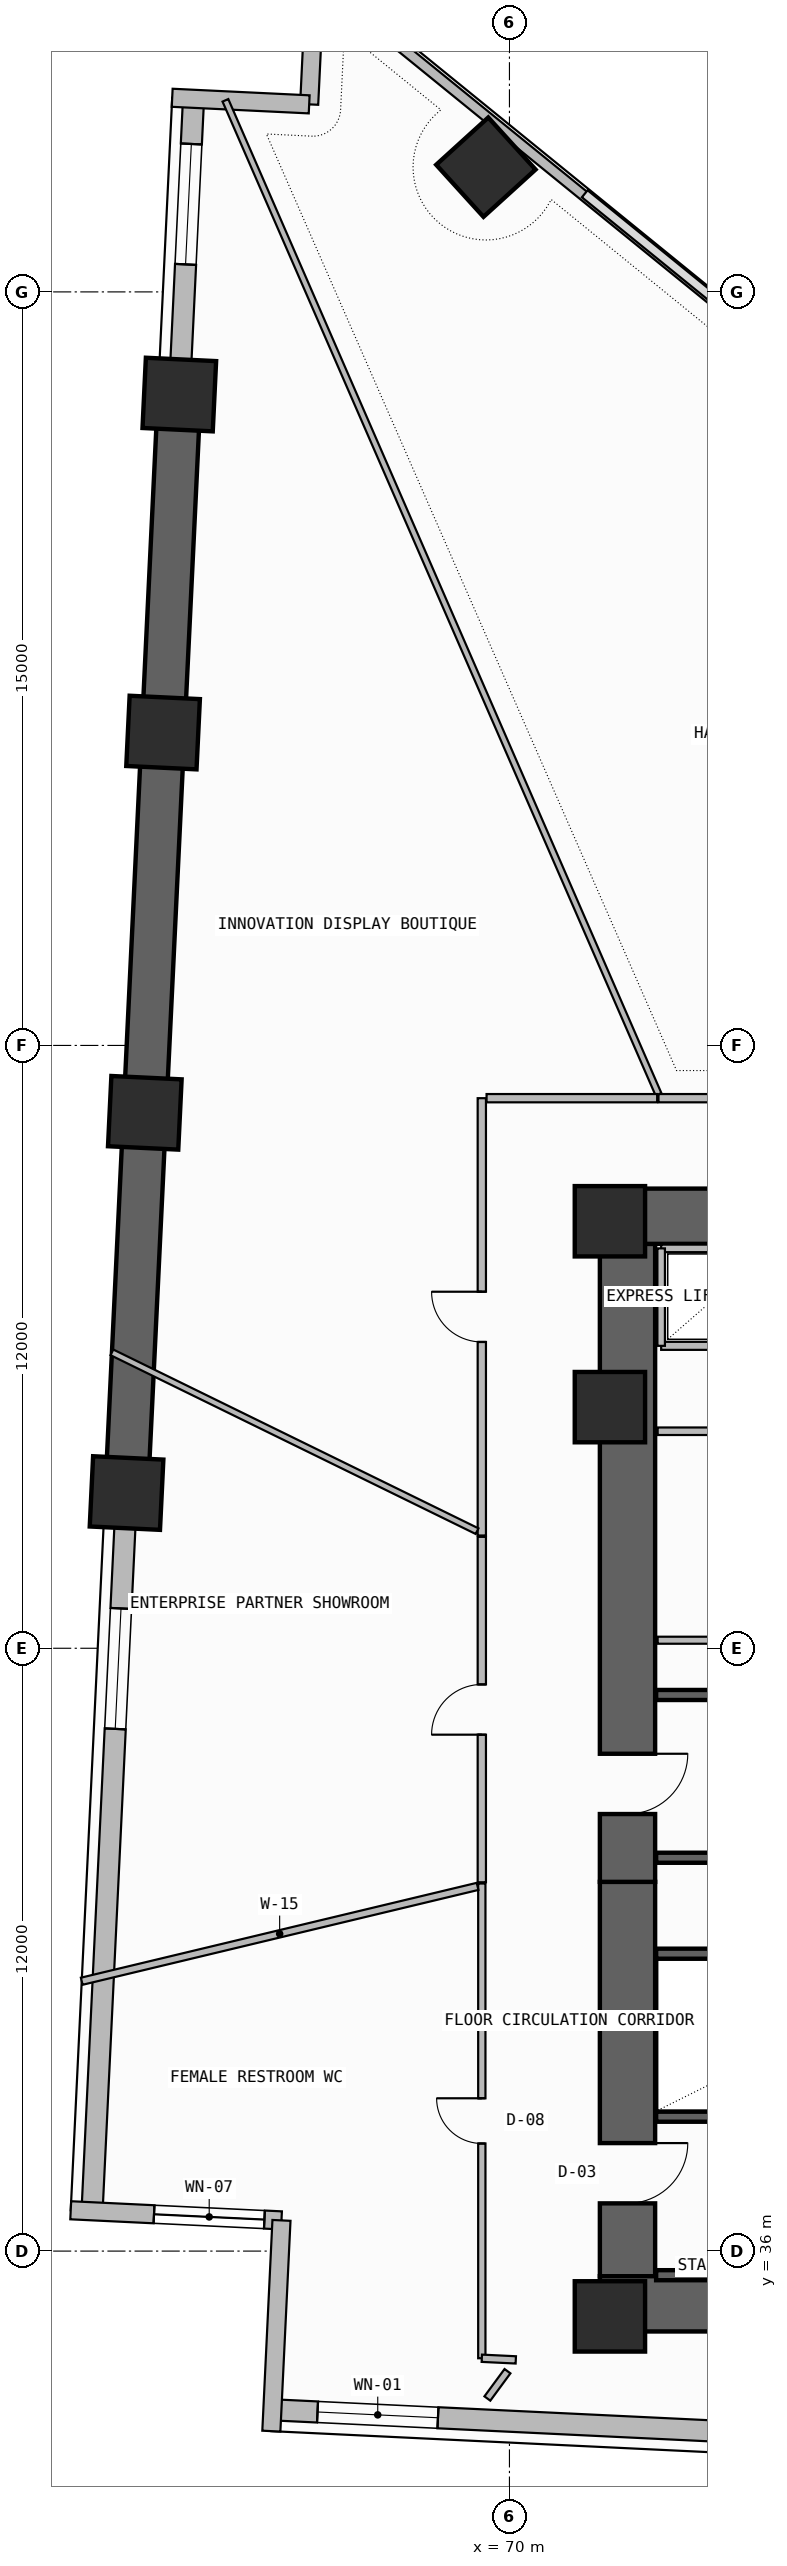
"""IFC4 building model, lengths in metres.
Left out: names, types, materials, properties, quantities, classifications, styles, units other than length and angle.
Written with IfcOpenShell. Run it as: python <this file> out.ifc"""

import sys

from ifc_helpers import new_model, si_unit, direction, frame, frame_2d, origin, origin_2d, place, context, subcontext, project, spatial, rectangle, extrude, element, fill, save


model = new_model("IFC4")
c1 = context("Model", 3, precision=1e-05, world=origin(), true_north=direction((0.0, 1.0)))
c2 = subcontext(c1, "Body", "Model", "MODEL_VIEW")
j1 = project(units=[si_unit("LENGTHUNIT", "METRE"), si_unit("PLANEANGLEUNIT", "RADIAN")], contexts=[c1])
p1 = place(None, origin())
s1 = spatial("IfcSite", under=j1, at=p1, CompositionType="ELEMENT")
p2 = place(p1, origin())
s2 = spatial("IfcBuilding", under=s1, at=p2, CompositionType="ELEMENT")
p3 = place(p2, frame((0.0, 0.0, 48.3)))
s3 = spatial("IfcBuildingStorey", under=s2, at=p3, CompositionType="ELEMENT", Elevation=48.3)
p4 = place(p3, frame((72.35, 35.5, -0.26), z_axis=(0.0, 0.0, 1.0), x_axis=(0.0, 1.0, 0.0)))
e1 = element("IfcWall", 1, at=p4, inside=s3, PredefinedType="SHEAR", context=c2, shape_type="SweptSolid", body=[
    extrude(rectangle(XDim=7.85, YDim=1.1, at=frame_2d((3.925, 0.0))), origin(), (0.0, 0.0, 1.0), 3.66),
])
p5 = place(p4, frame((1.45, 0.0, 0.26)))
e2 = element("IfcOpeningElement", 2, at=p5, cuts=e1, PredefinedType="OPENING", context=c2, shape_type="SweptSolid", body=[
    extrude(rectangle(XDim=1.2, YDim=2.2, at=frame_2d((0.6, 1.1))), frame((0.0, 0.56, 0.0), z_axis=(0.0, -1.0, 0.0), x_axis=(1.0, 0.0, 0.0)), (0.0, 0.0, 1.0), 1.12),
])
p6 = place(p3, frame((71.8, 34.95, -0.26), z_axis=(0.0, 0.0, 1.0), x_axis=(1.0, 0.0, 0.0)))
e3 = element("IfcWall", 3, at=p6, inside=s3, PredefinedType="SHEAR", context=c2, shape_type="SweptSolid", body=[
    extrude(rectangle(XDim=14.3, YDim=1.1, at=frame_2d((7.15, 0.0))), origin(), (0.0, 0.0, 1.0), 3.66),
])
p7 = place(p3, frame((72.35, 43.35, -0.26), z_axis=(0.0, 0.0, 1.0), x_axis=(0.0, 1.0, 0.0)))
e4 = element("IfcWall", 4, at=p7, inside=s3, PredefinedType="SHEAR", context=c2, shape_type="SweptSolid", body=[
    extrude(rectangle(XDim=12.7, YDim=1.1, at=frame_2d((6.35, 0.0))), origin(), (0.0, 0.0, 1.0), 3.66),
])
p8 = place(p7, frame((1.35, 0.0, 0.26)))
e5 = element("IfcOpeningElement", 5, at=p8, cuts=e4, PredefinedType="OPENING", context=c2, shape_type="SweptSolid", body=[
    extrude(rectangle(XDim=1.2, YDim=2.2, at=frame_2d((0.6, 1.1))), frame((0.0, 0.56, 0.0), z_axis=(0.0, -1.0, 0.0), x_axis=(1.0, 0.0, 0.0)), (0.0, 0.0, 1.0), 1.12),
])
p9 = place(p3, frame((71.8, 56.6, -0.26), z_axis=(0.0, 0.0, 1.0), x_axis=(1.0, 0.0, 0.0)))
e6 = element("IfcWall", 6, at=p9, inside=s3, PredefinedType="SHEAR", context=c2, shape_type="SweptSolid", body=[
    extrude(rectangle(XDim=14.3, YDim=1.1, at=frame_2d((7.15, 0.0))), origin(), (0.0, 0.0, 1.0), 3.66),
])
for number, where, z_axis, x_axis in (
    (7, (72.0, 34.7, 0.0), (0.0, 0.0, 1.0), (1.0, 0.0, 0.0)),
    (8, (72.0, 52.8, 0.0), (0.0, 0.0, 1.0), (1.0, 0.0, 0.0)),
    (9, (72.0, 56.5, 0.0), (0.0, 0.0, 1.0), (1.0, 0.0, 0.0)),
    (10, (69.531, 77.483, 0.0), (0.0, 0.0, 1.0), (0.74, 0.672, 0.0)),
    (11, (63.428, 72.957, 0.0), (0.0, 0.0, 1.0), (0.048, 0.999, 0.0)),
    (12, (63.105, 66.228, 0.0), (0.0, 0.0, 1.0), (0.048, 0.999, 0.0)),
    (13, (62.742, 58.659, 0.0), (0.0, 0.0, 1.0), (0.048, 0.999, 0.0)),
    (14, (62.378, 51.09, 0.0), (0.0, 0.0, 1.0), (0.048, 0.999, 0.0)),
):
    element("IfcColumn", number, at=place(p3, frame(where, z_axis=z_axis, x_axis=x_axis)), inside=s3, PredefinedType="COLUMN", context=c2, shape_type="SweptSolid", body=[
        extrude(rectangle(XDim=1.4, YDim=1.4, at=origin_2d()), origin(), (0.0, 0.0, 1.0), 3.6),
    ])
p10 = place(p3, frame((65.281, 32.841, 0.0), z_axis=(0.0, 0.0, 1.0), x_axis=(0.998848298084, -0.047979968897, 0.0)))
e15 = element("IfcWall", 15, at=p10, inside=s3, PredefinedType="SOLIDWALL", context=c2, shape_type="SweptSolid", body=[
    extrude(rectangle(XDim=17.952, YDim=0.42, at=frame_2d((8.976, 0.0))), origin(), (0.0, 0.0, 1.0), 2.385),
])
p11 = place(p10, frame((0.9, 0.0, 1.2)))
e16 = element("IfcOpeningElement", 16, at=p11, cuts=e15, PredefinedType="OPENING", context=c2, shape_type="SweptSolid", body=[
    extrude(rectangle(XDim=2.4, YDim=0.9, at=frame_2d((1.2, 0.45))), frame((0.0, 0.22, 0.0), z_axis=(0.0, -1.0, 0.0), x_axis=(1.0, 0.0, 0.0)), (0.0, 0.0, 1.0), 0.44),
])
p12 = place(p3, frame((63.711, 78.844, 0.0), z_axis=(0.0, 0.0, 1.0), x_axis=(-0.048007946398, -0.998846953784, 0.0)))
e17 = element("IfcWall", 17, at=p12, inside=s3, PredefinedType="SOLIDWALL", context=c2, shape_type="SweptSolid", body=[
    extrude(rectangle(XDim=5.894, YDim=0.42, at=frame_2d((2.947, 0.0))), origin(), (0.0, 0.0, 1.0), 2.385),
])
p13 = place(p12, frame((0.9, 0.0, 1.2)))
e18 = element("IfcOpeningElement", 18, at=p13, cuts=e17, PredefinedType="OPENING", context=c2, shape_type="SweptSolid", body=[
    extrude(rectangle(XDim=2.4, YDim=0.9, at=frame_2d((1.2, 0.45))), frame((0.0, 0.22, 0.0), z_axis=(0.0, -1.0, 0.0), x_axis=(1.0, 0.0, 0.0)), (0.0, 0.0, 1.0), 0.44),
])
p14 = place(p3, frame((63.428, 72.957, -0.26), z_axis=(0.0, 0.0, 1.0), x_axis=(-0.047976309476, -0.998848473858, 0.0)))
e19 = element("IfcWall", 19, at=p14, inside=s3, PredefinedType="SHEAR", context=c2, shape_type="SweptSolid", body=[
    extrude(rectangle(XDim=21.892, YDim=0.85, at=frame_2d((10.946, 0.0))), origin(), (0.0, 0.0, 1.0), 3.66),
])
p15 = place(p3, frame((62.378, 51.09, 0.0), z_axis=(0.0, 0.0, 1.0), x_axis=(-0.047978424452, -0.99884837227, 0.0)))
e20 = element("IfcWall", 20, at=p15, inside=s3, PredefinedType="SOLIDWALL", context=c2, shape_type="SweptSolid", body=[
    extrude(rectangle(XDim=14.314, YDim=0.42, at=frame_2d((7.157, 0.0))), origin(), (0.0, 0.0, 1.0), 2.385),
])
p16 = place(p15, frame((2.3, 0.0, 1.2)))
e21 = element("IfcOpeningElement", 21, at=p16, cuts=e20, PredefinedType="OPENING", context=c2, shape_type="SweptSolid", body=[
    extrude(rectangle(XDim=2.4, YDim=0.9, at=frame_2d((1.2, 0.45))), frame((0.0, 0.22, 0.0), z_axis=(0.0, -1.0, 0.0), x_axis=(1.0, 0.0, 0.0)), (0.0, 0.0, 1.0), 0.44),
])
p17 = place(p3, frame((66.144, 81.46, 0.0), z_axis=(0.0, 0.0, 1.0), x_axis=(-0.047934806162, -0.998850466465, 0.0)))
e22 = element("IfcWall", 22, at=p17, inside=s3, PredefinedType="SOLIDWALL", context=c2, shape_type="SweptSolid", body=[
    extrude(rectangle(XDim=2.73, YDim=0.36, at=frame_2d((1.365, 0.0))), origin(), (0.0, 0.0, 1.0), 3.4),
])
p18 = place(p17, frame((0.34, 0.0, 0.45)))
e23 = element("IfcOpeningElement", 23, at=p18, cuts=e22, PredefinedType="OPENING", context=c2, shape_type="SweptSolid", body=[
    extrude(rectangle(XDim=1.3, YDim=2.4, at=frame_2d((0.65, 1.2))), frame((0.0, 0.19, 0.0), z_axis=(0.0, -1.0, 0.0), x_axis=(1.0, 0.0, 0.0)), (0.0, 0.0, 1.0), 0.38),
])
p19 = place(p3, frame((66.013, 78.733, 0.0), z_axis=(0.0, 0.0, 1.0), x_axis=(-0.998846180588, 0.048024030708, 0.0)))
e24 = element("IfcWall", 24, at=p19, inside=s3, PredefinedType="SOLIDWALL", context=c2, shape_type="SweptSolid", body=[
    extrude(rectangle(XDim=2.73, YDim=0.36, at=frame_2d((1.365, 0.0))), origin(), (0.0, 0.0, 1.0), 3.4),
])
p20 = place(p3, frame((61.267, 36.812, 0.0), z_axis=(0.0, 0.0, 1.0), x_axis=(0.998849519138, -0.047954542207, 0.0)))
e25 = element("IfcWall", 25, at=p20, inside=s3, PredefinedType="SOLIDWALL", context=c2, shape_type="SweptSolid", body=[
    extrude(rectangle(XDim=4.2, YDim=0.36, at=frame_2d((2.1, 0.0))), origin(), (0.0, 0.0, 1.0), 3.4),
])
p21 = place(p20, frame((1.66, 0.0, 0.45)))
e26 = element("IfcOpeningElement", 26, at=p21, cuts=e25, PredefinedType="OPENING", context=c2, shape_type="SweptSolid", body=[
    extrude(rectangle(XDim=2.2, YDim=2.4, at=frame_2d((1.1, 1.2))), frame((0.0, 0.19, 0.0), z_axis=(0.0, -1.0, 0.0), x_axis=(1.0, 0.0, 0.0)), (0.0, 0.0, 1.0), 0.38),
])
p22 = place(p3, frame((65.462, 36.611, 0.0), z_axis=(0.0, 0.0, 1.0), x_axis=(-0.048015322758, -0.998846599224, 0.0)))
e27 = element("IfcWall", 27, at=p22, inside=s3, PredefinedType="SOLIDWALL", context=c2, shape_type="SweptSolid", body=[
    extrude(rectangle(XDim=4.2, YDim=0.36, at=frame_2d((2.1, 0.0))), origin(), (0.0, 0.0, 1.0), 3.4),
])
p23 = place(p3, frame((94.513, 58.196, 0.0), z_axis=(0.0, 0.0, 1.0), x_axis=(-0.776001602097, 0.630730935933, 0.0)))
e28 = element("IfcWall", 28, at=p23, inside=s3, PredefinedType="PARAPET", context=c2, shape_type="SweptSolid", body=[
    extrude(rectangle(XDim=36.148, YDim=0.2, at=frame_2d((18.074, 0.0))), origin(), (0.0, 0.0, 1.0), 1.15),
])
for number, where, z_axis, x_axis in (
    (29, (72.92, 35.52, -0.26), (0.0, 0.0, 1.0), (1.0, 0.0, 0.0)),
    (30, (72.92, 38.675, -0.26), (0.0, 0.0, 1.0), (1.0, 0.0, 0.0)),
):
    element("IfcWall", number, at=place(p3, frame(where, z_axis=z_axis, x_axis=x_axis)), inside=s3, PredefinedType="SOLIDWALL", context=c2, shape_type="SweptSolid", body=[
        extrude(rectangle(XDim=7.7, YDim=0.2, at=frame_2d((3.85, 0.0))), origin(), (0.0, 0.0, 1.0), 3.66),
    ])
p24 = place(p3, frame((72.92, 41.92, -0.26), z_axis=(0.0, 0.0, 1.0), x_axis=(1.0, 0.0, 0.0)))
e31 = element("IfcWall", 31, at=p24, inside=s3, PredefinedType="SOLIDWALL", context=c2, shape_type="SweptSolid", body=[
    extrude(rectangle(XDim=7.58, YDim=0.2, at=frame_2d((3.79, 0.0))), origin(), (0.0, 0.0, 1.0), 3.66),
])
for number, where, z_axis, x_axis in (
    (32, (72.92, 43.83, -0.26), (0.0, 0.0, 1.0), (1.0, 0.0, 0.0)),
    (33, (72.92, 47.07, -0.26), (0.0, 0.0, 1.0), (1.0, 0.0, 0.0)),
):
    element("IfcWall", number, at=place(p3, frame(where, z_axis=z_axis, x_axis=x_axis)), inside=s3, PredefinedType="SOLIDWALL", context=c2, shape_type="SweptSolid", body=[
        extrude(rectangle(XDim=7.7, YDim=0.2, at=frame_2d((3.85, 0.0))), origin(), (0.0, 0.0, 1.0), 3.66),
    ])
p25 = place(p3, frame((72.95, 52.32, 0.0), z_axis=(0.0, 0.0, 1.0), x_axis=(1.0, 0.0, 0.0)))
e34 = element("IfcWall", 34, at=p25, inside=s3, PredefinedType="SOLIDWALL", context=c2, shape_type="SweptSolid", body=[
    extrude(rectangle(XDim=3.33, YDim=0.15, at=frame_2d((1.665, 0.0))), origin(), (0.0, 0.0, 1.0), 3.4),
])
p26 = place(p3, frame((72.95, 48.16, 0.0), z_axis=(0.0, 0.0, 1.0), x_axis=(1.0, 0.0, 0.0)))
e35 = element("IfcWall", 35, at=p26, inside=s3, PredefinedType="PLUMBINGWALL", context=c2, shape_type="SweptSolid", body=[
    extrude(rectangle(XDim=3.24, YDim=0.14, at=frame_2d((1.62, 0.0))), origin(), (0.0, 0.0, 1.0), 3.4),
])
p27 = place(p3, frame((73.02, 54.02, 0.0), z_axis=(0.0, 0.0, 1.0), x_axis=(1.0, 0.0, 0.0)))
e36 = element("IfcWall", 36, at=p27, inside=s3, PredefinedType="SOLIDWALL", context=c2, shape_type="SweptSolid", body=[
    extrude(rectangle(XDim=12.08, YDim=0.16, at=frame_2d((6.04, 0.0))), origin(), (0.0, 0.0, 1.0), 3.4),
])
p28 = place(p3, frame((73.02, 55.96, 0.0), z_axis=(0.0, 0.0, 1.0), x_axis=(1.0, 0.0, 0.0)))
e37 = element("IfcWall", 37, at=p28, inside=s3, PredefinedType="SOLIDWALL", context=c2, shape_type="SweptSolid", body=[
    extrude(rectangle(XDim=3.5, YDim=0.15, at=frame_2d((1.75, 0.0))), origin(), (0.0, 0.0, 1.0), 3.4),
])
p29 = place(p3, frame((73.02, 54.02, 0.0), z_axis=(0.0, 0.0, 1.0), x_axis=(0.0, 1.0, 0.0)))
e38 = element("IfcWall", 38, at=p29, inside=s3, PredefinedType="PLUMBINGWALL", context=c2, shape_type="SweptSolid", body=[
    extrude(rectangle(XDim=1.94, YDim=0.15, at=frame_2d((0.97, 0.0))), origin(), (0.0, 0.0, 1.0), 3.4),
])
p30 = place(p3, frame((69.45, 43.317, 0.0), z_axis=(0.0, 0.0, 1.0), x_axis=(0.0, -1.0, 0.0)))
e39 = element("IfcWall", 39, at=p30, inside=s3, PredefinedType="PARTITIONING", context=c2, shape_type="SweptSolid", body=[
    extrude(rectangle(XDim=9.45, YDim=0.145, at=frame_2d((4.725, 0.0))), origin(), (0.0, 0.0, 1.0), 3.4),
])
p31 = place(p30, frame((4.275, 0.0, 0.0)))
e40 = element("IfcOpeningElement", 40, at=p31, cuts=e39, PredefinedType="OPENING", context=c2, shape_type="SweptSolid", body=[
    extrude(rectangle(XDim=0.9, YDim=2.1, at=frame_2d((0.45, 1.05))), frame((0.0, 0.083, 0.0), z_axis=(0.0, -1.0, 0.0), x_axis=(1.0, 0.0, 0.0)), (0.0, 0.0, 1.0), 0.165),
])
p32 = place(p3, frame((69.45, 33.867, 0.0), z_axis=(0.0, 0.0, 1.0), x_axis=(0.998850124938, -0.047941922272, 0.0)))
e41 = element("IfcWall", 41, at=p32, inside=s3, PredefinedType="PARTITIONING", context=c2, shape_type="SweptSolid", body=[
    extrude(rectangle(XDim=0.677, YDim=0.145, at=frame_2d((0.339, 0.0))), origin(), (0.0, 0.0, 1.0), 3.4),
])
p33 = place(p3, frame((61.486, 41.372, 0.0), z_axis=(0.0, 0.0, 1.0), x_axis=(0.97247092841, 0.233024233496, 0.0)))
e42 = element("IfcWall", 42, at=p33, inside=s3, PredefinedType="PARTITIONING", context=c2, shape_type="SweptSolid", body=[
    extrude(rectangle(XDim=8.103, YDim=0.145, at=frame_2d((4.052, 0.0))), origin(), (0.0, 0.0, 1.0), 3.4),
])
p34 = place(p3, frame((82.704, 58.95, 0.0), z_axis=(0.0, 0.0, 1.0), x_axis=(-1.0, 0.0, 0.0)))
e43 = element("IfcWall", 43, at=p34, inside=s3, PredefinedType="PARTITIONING", context=c2, shape_type="SweptSolid", body=[
    extrude(rectangle(XDim=9.737, YDim=0.165, at=frame_2d((4.869, 0.0))), origin(), (0.0, 0.0, 1.0), 3.4),
])
p35 = place(p34, frame((4.369, 0.0, 0.0)))
e44 = element("IfcOpeningElement", 44, at=p35, cuts=e43, PredefinedType="OPENING", context=c2, shape_type="SweptSolid", body=[
    extrude(rectangle(XDim=1.0, YDim=2.2, at=frame_2d((0.5, 1.1))), frame((0.0, 0.093, 0.0), z_axis=(0.0, -1.0, 0.0), x_axis=(1.0, 0.0, 0.0)), (0.0, 0.0, 1.0), 0.185),
])
p36 = place(p3, frame((72.967, 59.028, 0.0), z_axis=(0.0, 0.0, 1.0), x_axis=(-0.399433319224, 0.916762250256, 0.0)))
e45 = element("IfcWall", 45, at=p36, inside=s3, PredefinedType="PARTITIONING", context=c2, shape_type="SweptSolid", body=[
    extrude(rectangle(XDim=21.582, YDim=0.125, at=frame_2d((10.791, 0.0))), origin(), (0.0, 0.0, 1.0), 2.785),
])
p37 = place(p3, frame((69.45, 58.95, 0.0), z_axis=(0.0, 0.0, 1.0), x_axis=(0.0, -1.0, 0.0)))
e46 = element("IfcWall", 46, at=p37, inside=s3, PredefinedType="PARTITIONING", context=c2, shape_type="SweptSolid", body=[
    extrude(rectangle(XDim=8.705, YDim=0.165, at=frame_2d((4.353, 0.0))), origin(), (0.0, 0.0, 1.0), 2.785),
])
p38 = place(p37, frame((3.853, 0.0, 0.0)))
e47 = element("IfcOpeningElement", 47, at=p38, cuts=e46, PredefinedType="OPENING", context=c2, shape_type="SweptSolid", body=[
    extrude(rectangle(XDim=1.0, YDim=2.2, at=frame_2d((0.5, 1.1))), frame((0.0, 0.093, 0.0), z_axis=(0.0, -1.0, 0.0), x_axis=(1.0, 0.0, 0.0)), (0.0, 0.0, 1.0), 0.185),
])
p39 = place(p3, frame((72.94, 58.95, 0.0), z_axis=(0.0, 0.0, 1.0), x_axis=(-1.0, 0.0, 0.0)))
e48 = element("IfcWall", 48, at=p39, inside=s3, PredefinedType="PARTITIONING", context=c2, shape_type="SweptSolid", body=[
    extrude(rectangle(XDim=3.396, YDim=0.165, at=frame_2d((1.698, 0.0))), origin(), (0.0, 0.0, 1.0), 2.785),
])
p40 = place(p3, frame((69.355, 50.331, 0.0), z_axis=(0.0, 0.0, 1.0), x_axis=(-0.898100885769, 0.439789493941, 0.0)))
e49 = element("IfcWall", 49, at=p40, inside=s3, PredefinedType="PARTITIONING", context=c2, shape_type="SweptSolid", body=[
    extrude(rectangle(XDim=8.093, YDim=0.125, at=frame_2d((4.047, 0.0))), origin(), (0.0, 0.0, 1.0), 2.385),
])
p41 = place(p3, frame((69.45, 50.218, 0.0), z_axis=(0.0, 0.0, 1.0), x_axis=(0.0, -1.0, 0.0)))
e50 = element("IfcWall", 50, at=p41, inside=s3, PredefinedType="PARTITIONING", context=c2, shape_type="SweptSolid", body=[
    extrude(rectangle(XDim=6.876, YDim=0.165, at=frame_2d((3.438, 0.0))), origin(), (0.0, 0.0, 1.0), 3.4),
])
p42 = place(p41, frame((2.938, 0.0, 0.0)))
e51 = element("IfcOpeningElement", 51, at=p42, cuts=e50, PredefinedType="OPENING", context=c2, shape_type="SweptSolid", body=[
    extrude(rectangle(XDim=1.0, YDim=2.2, at=frame_2d((0.5, 1.1))), frame((0.0, 0.093, 0.0), z_axis=(0.0, -1.0, 0.0), x_axis=(1.0, 0.0, 0.0)), (0.0, 0.0, 1.0), 0.185),
])
p43 = place(p3, frame((69.961, 33.609, 0.0), z_axis=(0.0, 0.0, 1.0), x_axis=(-0.592569888058, -0.805519042461, 0.0)))
e52 = element("IfcWall", 52, at=p43, inside=s3, PredefinedType="PARTITIONING", context=c2, shape_type="SweptSolid", body=[
    extrude(rectangle(XDim=0.675, YDim=0.145, at=frame_2d((0.338, 0.0))), origin(), (0.0, 0.0, 1.0), 3.4),
])
p44 = place(p11, origin())
e53 = element("IfcWindow", 53, at=p44, inside=s3, PartitioningType="SINGLE_PANEL", PredefinedType="WINDOW", context=c2, shape_type="SweptSolid", body=[
    extrude(rectangle(XDim=2.4, YDim=0.9, at=frame_2d((1.2, 0.45))), frame((0.0, 0.03, 0.0), z_axis=(0.0, -1.0, 0.0), x_axis=(1.0, 0.0, 0.0)), (0.0, 0.0, 1.0), 0.06),
])
fill(e16, e53)
p45 = place(p13, origin())
e54 = element("IfcWindow", 54, at=p45, inside=s3, PartitioningType="SINGLE_PANEL", PredefinedType="WINDOW", context=c2, shape_type="SweptSolid", body=[
    extrude(rectangle(XDim=2.4, YDim=0.9, at=frame_2d((1.2, 0.45))), frame((0.0, 0.03, 0.0), z_axis=(0.0, -1.0, 0.0), x_axis=(1.0, 0.0, 0.0)), (0.0, 0.0, 1.0), 0.06),
])
fill(e18, e54)
p46 = place(p16, origin())
e55 = element("IfcWindow", 55, at=p46, inside=s3, PartitioningType="SINGLE_PANEL", PredefinedType="WINDOW", context=c2, shape_type="SweptSolid", body=[
    extrude(rectangle(XDim=2.4, YDim=0.9, at=frame_2d((1.2, 0.45))), frame((0.0, 0.03, 0.0), z_axis=(0.0, -1.0, 0.0), x_axis=(1.0, 0.0, 0.0)), (0.0, 0.0, 1.0), 0.06),
])
fill(e21, e55)
p47 = place(p21, origin())
e56 = element("IfcWindow", 56, at=p47, inside=s3, PartitioningType="SINGLE_PANEL", PredefinedType="WINDOW", context=c2, shape_type="SweptSolid", body=[
    extrude(rectangle(XDim=2.2, YDim=2.4, at=frame_2d((1.1, 1.2))), frame((0.0, 0.03, 0.0), z_axis=(0.0, -1.0, 0.0), x_axis=(1.0, 0.0, 0.0)), (0.0, 0.0, 1.0), 0.06),
])
fill(e26, e56)
p48 = place(p5, frame((1.2, 0.0, 0.0), z_axis=(0.0, 0.0, 1.0), x_axis=(-1.0, 0.0, 0.0)))
e57 = element("IfcDoor", 57, at=p48, inside=s3, OperationType="SINGLE_SWING_LEFT", PredefinedType="USERDEFINED", context=c2, shape_type="SweptSolid", body=[
    extrude(rectangle(XDim=1.2, YDim=2.2, at=frame_2d((0.6, 1.1))), frame((0.0, 0.025, 0.0), z_axis=(0.0, -1.0, 0.0), x_axis=(1.0, 0.0, 0.0)), (0.0, 0.0, 1.0), 0.05),
])
fill(e2, e57)
p49 = place(p8, frame((1.2, 0.0, 0.0), z_axis=(0.0, 0.0, 1.0), x_axis=(-1.0, 0.0, 0.0)))
e58 = element("IfcDoor", 58, at=p49, inside=s3, OperationType="SINGLE_SWING_LEFT", PredefinedType="USERDEFINED", context=c2, shape_type="SweptSolid", body=[
    extrude(rectangle(XDim=1.2, YDim=2.2, at=frame_2d((0.6, 1.1))), frame((0.0, 0.025, 0.0), z_axis=(0.0, -1.0, 0.0), x_axis=(1.0, 0.0, 0.0)), (0.0, 0.0, 1.0), 0.05),
])
fill(e5, e58)
p50 = place(p31, frame((0.9, 0.0, 0.0), z_axis=(0.0, 0.0, 1.0), x_axis=(-1.0, 0.0, 0.0)))
e59 = element("IfcDoor", 59, at=p50, inside=s3, OperationType="SINGLE_SWING_RIGHT", PredefinedType="DOOR", context=c2, shape_type="SweptSolid", body=[
    extrude(rectangle(XDim=0.9, YDim=2.1, at=frame_2d((0.45, 1.05))), frame((0.0, 0.025, 0.0), z_axis=(0.0, -1.0, 0.0), x_axis=(1.0, 0.0, 0.0)), (0.0, 0.0, 1.0), 0.05),
])
fill(e40, e59)
p51 = place(p38, frame((1.0, 0.0, 0.0), z_axis=(0.0, 0.0, 1.0), x_axis=(-1.0, 0.0, 0.0)))
e60 = element("IfcDoor", 60, at=p51, inside=s3, OperationType="SINGLE_SWING_RIGHT", PredefinedType="DOOR", context=c2, shape_type="SweptSolid", body=[
    extrude(rectangle(XDim=1.0, YDim=2.2, at=frame_2d((0.5, 1.1))), frame((0.0, 0.025, 0.0), z_axis=(0.0, -1.0, 0.0), x_axis=(1.0, 0.0, 0.0)), (0.0, 0.0, 1.0), 0.05),
])
fill(e47, e60)
p52 = place(p42, frame((1.0, 0.0, 0.0), z_axis=(0.0, 0.0, 1.0), x_axis=(-1.0, 0.0, 0.0)))
e61 = element("IfcDoor", 61, at=p52, inside=s3, OperationType="SINGLE_SWING_LEFT", PredefinedType="DOOR", context=c2, shape_type="SweptSolid", body=[
    extrude(rectangle(XDim=1.0, YDim=2.2, at=frame_2d((0.5, 1.1))), frame((0.0, 0.025, 0.0), z_axis=(0.0, -1.0, 0.0), x_axis=(1.0, 0.0, 0.0)), (0.0, 0.0, 1.0), 0.05),
])
fill(e51, e61)
save(model, sys.argv[1])
